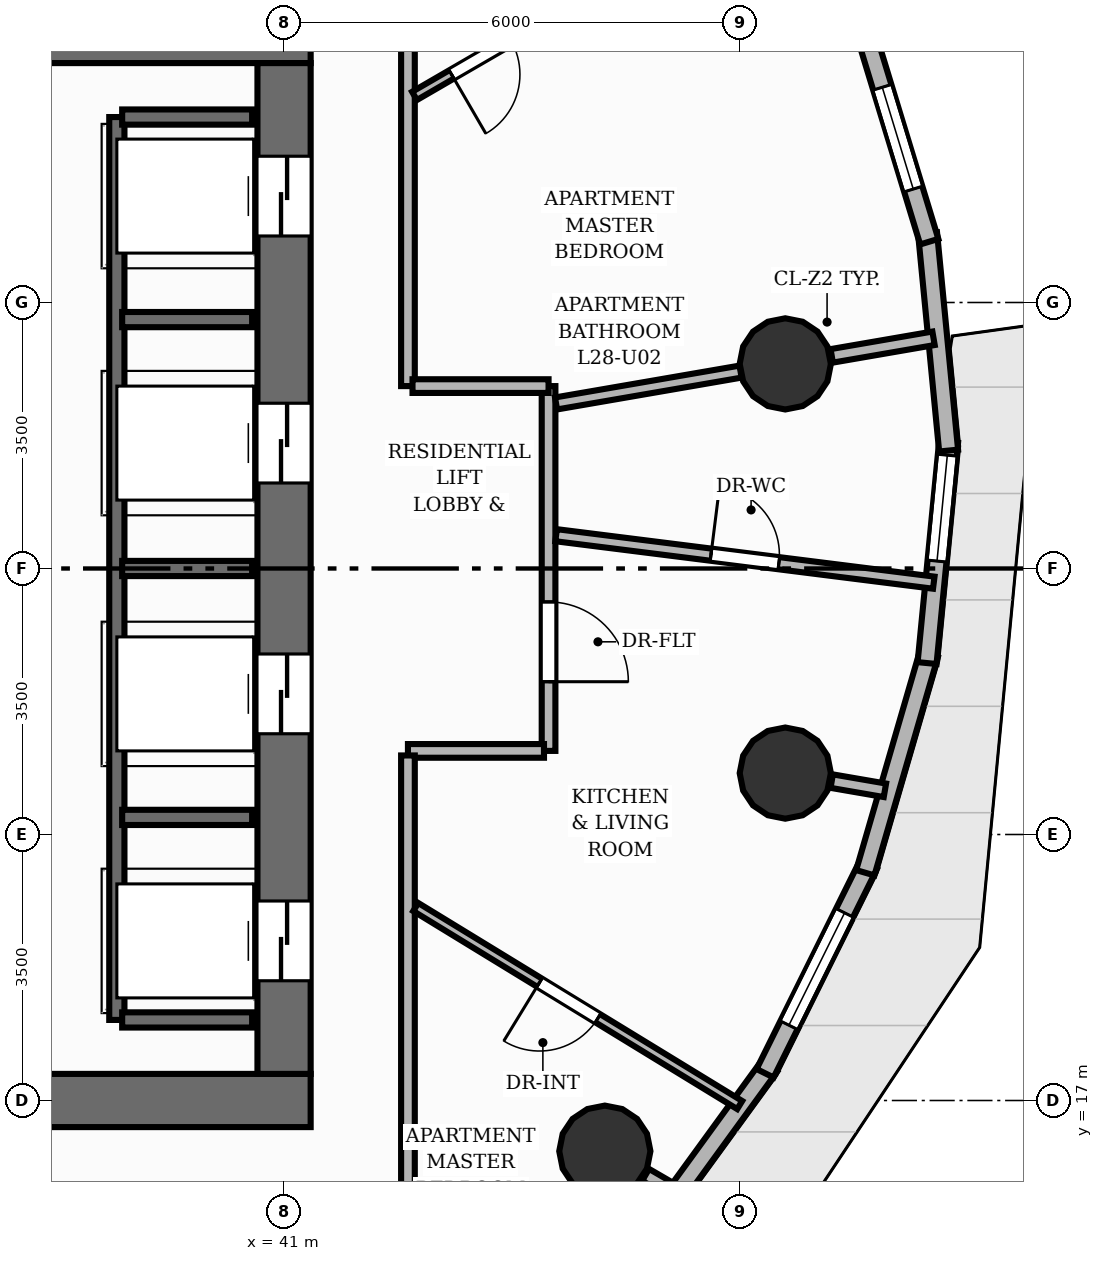
"""IFC4 building model, lengths in metres.
Left out: names, types, materials, properties, quantities, classifications, styles, units other than length and angle.
Written with IfcOpenShell. Run it as: python <this file> out.ifc"""

import sys

from ifc_helpers import new_model, si_unit, direction, frame, frame_2d, origin, origin_2d, place, context, subcontext, project, spatial, rectangle, circle, extrude, element, fill, save


model = new_model("IFC4")
c1 = context("Model", 3, precision=1e-05, world=origin(), true_north=direction((0.0, 1.0)))
c2 = subcontext(c1, "Body", "Model", "MODEL_VIEW")
j1 = project(units=[si_unit("LENGTHUNIT", "METRE"), si_unit("PLANEANGLEUNIT", "RADIAN")], contexts=[c1])
p1 = place(None, origin())
s1 = spatial("IfcSite", under=j1, at=p1, CompositionType="ELEMENT")
p2 = place(p1, origin())
s2 = spatial("IfcBuilding", under=s1, at=p2, CompositionType="ELEMENT")
p3 = place(p2, frame((0.0, 0.0, 96.48)))
s3 = spatial("IfcBuildingStorey", under=s2, at=p3, CompositionType="ELEMENT", Elevation=96.48)
p4 = place(p3, frame((22.65, 17.0, 0.0), z_axis=(0.0, 0.0, 1.0), x_axis=(1.0, 0.0, 0.0)))
e1 = element("IfcWall", 1, at=p4, inside=s3, PredefinedType="SHEAR", context=c2, shape_type="SweptSolid", body=[
    extrude(rectangle(XDim=18.7, YDim=0.7, at=frame_2d((9.35, 0.0))), origin(), (0.0, 0.0, 1.0), 3.2),
])
p5 = place(p4, frame((5.85, 0.0, 0.0)))
e2 = element("IfcOpeningElement", 2, at=p5, cuts=e1, PredefinedType="OPENING", context=c2, shape_type="SweptSolid", body=[
    extrude(rectangle(XDim=1.1, YDim=2.15, at=frame_2d((0.55, 1.075))), frame((0.0, 0.36, 0.0), z_axis=(0.0, -1.0, 0.0), x_axis=(1.0, 0.0, 0.0)), (0.0, 0.0, 1.0), 0.72),
])
p6 = place(p4, frame((9.4, 0.0, 0.0)))
e3 = element("IfcOpeningElement", 3, at=p6, cuts=e1, PredefinedType="OPENING", context=c2, shape_type="SweptSolid", body=[
    extrude(rectangle(XDim=0.9, YDim=2.1, at=frame_2d((0.45, 1.05))), frame((0.0, 0.36, 0.0), z_axis=(0.0, -1.0, 0.0), x_axis=(1.0, 0.0, 0.0)), (0.0, 0.0, 1.0), 0.72),
])
p7 = place(p3, frame((22.65, 31.0, 0.0), z_axis=(0.0, 0.0, 1.0), x_axis=(1.0, 0.0, 0.0)))
e4 = element("IfcWall", 4, at=p7, inside=s3, PredefinedType="SHEAR", context=c2, shape_type="SweptSolid", body=[
    extrude(rectangle(XDim=18.7, YDim=0.7, at=frame_2d((9.35, 0.0))), origin(), (0.0, 0.0, 1.0), 3.2),
])
p8 = place(p7, frame((11.75, 0.0, 0.0)))
e5 = element("IfcOpeningElement", 5, at=p8, cuts=e4, PredefinedType="OPENING", context=c2, shape_type="SweptSolid", body=[
    extrude(rectangle(XDim=1.1, YDim=2.15, at=frame_2d((0.55, 1.075))), frame((0.0, 0.36, 0.0), z_axis=(0.0, -1.0, 0.0), x_axis=(1.0, 0.0, 0.0)), (0.0, 0.0, 1.0), 0.72),
])
p9 = place(p3, frame((41.0, 17.35, 0.0), z_axis=(0.0, 0.0, 1.0), x_axis=(0.0, 1.0, 0.0)))
e6 = element("IfcWall", 6, at=p9, inside=s3, PredefinedType="SHEAR", context=c2, shape_type="SweptSolid", body=[
    extrude(rectangle(XDim=13.3, YDim=0.7, at=frame_2d((6.65, 0.0))), origin(), (0.0, 0.0, 1.0), 3.2),
])
p10 = place(p9, frame((1.225, 0.0, 0.0)))
e7 = element("IfcOpeningElement", 7, at=p10, cuts=e6, PredefinedType="OPENING", context=c2, shape_type="SweptSolid", body=[
    extrude(rectangle(XDim=1.05, YDim=2.15, at=frame_2d((0.525, 1.075))), frame((0.0, 0.36, 0.0), z_axis=(0.0, -1.0, 0.0), x_axis=(1.0, 0.0, 0.0)), (0.0, 0.0, 1.0), 0.72),
])
p11 = place(p9, frame((4.475, 0.0, 0.0)))
e8 = element("IfcOpeningElement", 8, at=p11, cuts=e6, PredefinedType="OPENING", context=c2, shape_type="SweptSolid", body=[
    extrude(rectangle(XDim=1.05, YDim=2.15, at=frame_2d((0.525, 1.075))), frame((0.0, 0.36, 0.0), z_axis=(0.0, -1.0, 0.0), x_axis=(1.0, 0.0, 0.0)), (0.0, 0.0, 1.0), 0.72),
])
p12 = place(p9, frame((7.775, 0.0, 0.0)))
e9 = element("IfcOpeningElement", 9, at=p12, cuts=e6, PredefinedType="OPENING", context=c2, shape_type="SweptSolid", body=[
    extrude(rectangle(XDim=1.05, YDim=2.15, at=frame_2d((0.525, 1.075))), frame((0.0, 0.36, 0.0), z_axis=(0.0, -1.0, 0.0), x_axis=(1.0, 0.0, 0.0)), (0.0, 0.0, 1.0), 0.72),
])
p13 = place(p9, frame((11.025, 0.0, 0.0)))
e10 = element("IfcOpeningElement", 10, at=p13, cuts=e6, PredefinedType="OPENING", context=c2, shape_type="SweptSolid", body=[
    extrude(rectangle(XDim=1.05, YDim=2.15, at=frame_2d((0.525, 1.075))), frame((0.0, 0.36, 0.0), z_axis=(0.0, -1.0, 0.0), x_axis=(1.0, 0.0, 0.0)), (0.0, 0.0, 1.0), 0.72),
])
for number, where, z_axis, x_axis in (
    (11, (47.594, 26.692, 0.0), (0.0, 0.0, 1.0), (1.0, 0.0, 0.0)),
    (12, (45.22, 16.333, 0.0), (0.0, 0.0, 1.0), (1.0, 0.0, 0.0)),
    (13, (47.594, 21.308, 0.0), (0.0, 0.0, 1.0), (1.0, 0.0, 0.0)),
):
    element("IfcColumn", number, at=place(p3, frame(where, z_axis=z_axis, x_axis=x_axis)), inside=s3, PredefinedType="COLUMN", context=c2, shape_type="SweptSolid", body=[
        extrude(circle(Radius=0.6, at=origin_2d()), origin(), (0.0, 0.0, 1.0), 3.2),
    ])
p14 = place(p3, frame((47.386, 17.453, 0.0), z_axis=(0.0, 0.0, 1.0), x_axis=(-0.588208785685, -0.808709109905, 0.0)))
e14 = element("IfcWall", 14, at=p14, inside=s3, PredefinedType="SOLIDWALL", context=c2, shape_type="SweptSolid", body=[
    extrude(rectangle(XDim=3.131, YDim=0.25, at=frame_2d((1.565, 0.0))), origin(), (0.0, 0.0, 1.0), 2.96),
])
p15 = place(p3, frame((48.688, 20.101, 0.0), z_axis=(0.0, 0.0, 1.0), x_axis=(-0.443988069997, -0.896032696781, 0.0)))
e15 = element("IfcWall", 15, at=p15, inside=s3, PredefinedType="SOLIDWALL", context=c2, shape_type="SweptSolid", body=[
    extrude(rectangle(XDim=3.061, YDim=0.25, at=frame_2d((1.53, 0.0))), origin(), (0.0, 0.0, 1.0), 2.96),
])
p16 = place(p15, frame((0.705, 0.0, 0.85)))
e16 = element("IfcOpeningElement", 16, at=p16, cuts=e15, PredefinedType="OPENING", context=c2, shape_type="SweptSolid", body=[
    extrude(rectangle(XDim=1.65, YDim=1.55, at=frame_2d((0.825, 0.775))), frame((0.0, 0.135, 0.0), z_axis=(0.0, -1.0, 0.0), x_axis=(1.0, 0.0, 0.0)), (0.0, 0.0, 1.0), 0.27),
])
p17 = place(p3, frame((49.481, 22.866, 0.0), z_axis=(0.0, 0.0, 1.0), x_axis=(-0.279152874041, -0.960246672952, 0.0)))
e17 = element("IfcWall", 17, at=p17, inside=s3, PredefinedType="SOLIDWALL", context=c2, shape_type="SweptSolid", body=[
    extrude(rectangle(XDim=2.989, YDim=0.25, at=frame_2d((1.494, 0.0))), origin(), (0.0, 0.0, 1.0), 2.96),
])
p18 = place(p3, frame((49.743, 25.665, 0.0), z_axis=(0.0, 0.0, 1.0), x_axis=(-0.096873982201, -0.995296655059, 0.0)))
e18 = element("IfcWall", 18, at=p18, inside=s3, PredefinedType="SOLIDWALL", context=c2, shape_type="SweptSolid", body=[
    extrude(rectangle(XDim=2.923, YDim=0.25, at=frame_2d((1.462, 0.0))), origin(), (0.0, 0.0, 1.0), 2.96),
])
p19 = place(p18, frame((0.175, 0.0, 0.85)))
e19 = element("IfcOpeningElement", 19, at=p19, cuts=e18, PredefinedType="OPENING", context=c2, shape_type="SweptSolid", body=[
    extrude(rectangle(XDim=1.4, YDim=1.55, at=frame_2d((0.7, 0.775))), frame((0.0, 0.135, 0.0), z_axis=(0.0, -1.0, 0.0), x_axis=(1.0, 0.0, 0.0)), (0.0, 0.0, 1.0), 0.27),
])
p20 = place(p3, frame((49.467, 28.412, 0.0), z_axis=(0.0, 0.0, 1.0), x_axis=(0.096332339466, -0.995349225334, 0.0)))
e20 = element("IfcWall", 20, at=p20, inside=s3, PredefinedType="SOLIDWALL", context=c2, shape_type="SweptSolid", body=[
    extrude(rectangle(XDim=2.874, YDim=0.25, at=frame_2d((1.437, 0.0))), origin(), (0.0, 0.0, 1.0), 2.96),
])
p21 = place(p3, frame((48.66, 31.024, 0.0), z_axis=(0.0, 0.0, 1.0), x_axis=(0.291144558409, -0.956679071637, 0.0)))
e21 = element("IfcWall", 21, at=p21, inside=s3, PredefinedType="SOLIDWALL", context=c2, shape_type="SweptSolid", body=[
    extrude(rectangle(XDim=2.848, YDim=0.25, at=frame_2d((1.424, 0.0))), origin(), (0.0, 0.0, 1.0), 2.96),
])
p22 = place(p21, frame((0.724, 0.0, 0.85)))
e22 = element("IfcOpeningElement", 22, at=p22, cuts=e21, PredefinedType="OPENING", context=c2, shape_type="SweptSolid", body=[
    extrude(rectangle(XDim=1.4, YDim=1.55, at=frame_2d((0.7, 0.775))), frame((0.0, 0.135, 0.0), z_axis=(0.0, -1.0, 0.0), x_axis=(1.0, 0.0, 0.0)), (0.0, 0.0, 1.0), 0.27),
])
p23 = place(p3, frame((38.8, 18.06, 0.0), z_axis=(0.0, 0.0, 1.0), x_axis=(0.0, 1.0, 0.0)))
e23 = element("IfcWall", 23, at=p23, inside=s3, PredefinedType="SHEAR", context=c2, shape_type="SweptSolid", body=[
    extrude(rectangle(XDim=11.88, YDim=0.2, at=frame_2d((5.94, 0.0))), origin(), (0.0, 0.0, 1.0), 3.2),
])
for number, where, z_axis, x_axis in (
    (24, (38.87, 18.06, 0.0), (0.0, 0.0, 1.0), (1.0, 0.0, 0.0)),
    (25, (38.87, 29.94, 0.0), (0.0, 0.0, 1.0), (1.0, 0.0, 0.0)),
    (26, (38.87, 20.725, 0.0), (0.0, 0.0, 1.0), (1.0, 0.0, 0.0)),
    (27, (38.87, 24.0, 0.0), (0.0, 0.0, 1.0), (1.0, 0.0, 0.0)),
    (28, (38.87, 27.275, 0.0), (0.0, 0.0, 1.0), (1.0, 0.0, 0.0)),
):
    element("IfcWall", number, at=place(p3, frame(where, z_axis=z_axis, x_axis=x_axis)), inside=s3, PredefinedType="SHEAR", context=c2, shape_type="SweptSolid", body=[
        extrude(rectangle(XDim=1.71, YDim=0.2, at=frame_2d((0.855, 0.0))), origin(), (0.0, 0.0, 1.0), 3.2),
    ])
p24 = place(p3, frame((48.206, 26.798, 0.0), z_axis=(0.0, 0.0, 1.0), x_axis=(0.98540615772, 0.170219576807, 0.0)))
e29 = element("IfcWall", 29, at=p24, inside=s3, PredefinedType="PARTITIONING", context=c2, shape_type="SweptSolid", body=[
    extrude(rectangle(XDim=1.36, YDim=0.18, at=frame_2d((0.68, 0.0))), origin(), (0.0, 0.0, 1.0), 2.26),
])
p25 = place(p3, frame((45.757, 16.022, 0.0), z_axis=(0.0, 0.0, 1.0), x_axis=(0.864926134071, -0.501899175733, 0.0)))
e30 = element("IfcWall", 30, at=p25, inside=s3, PredefinedType="PARTITIONING", context=c2, shape_type="SweptSolid", body=[
    extrude(rectangle(XDim=0.424, YDim=0.18, at=frame_2d((0.212, 0.0))), origin(), (0.0, 0.0, 1.0), 2.26),
])
p26 = place(p3, frame((48.206, 21.202, 0.0), z_axis=(0.0, 0.0, 1.0), x_axis=(0.985420399327, -0.17013711115, 0.0)))
e31 = element("IfcWall", 31, at=p26, inside=s3, PredefinedType="PARTITIONING", context=c2, shape_type="SweptSolid", body=[
    extrude(rectangle(XDim=0.71, YDim=0.18, at=frame_2d((0.355, 0.0))), origin(), (0.0, 0.0, 1.0), 2.26),
])
p27 = place(p3, frame((44.48, 26.4, 0.0), z_axis=(0.0, 0.0, 1.0), x_axis=(0.0, -1.0, 0.0)))
e32 = element("IfcWall", 32, at=p27, inside=s3, PredefinedType="PARTITIONING", context=c2, shape_type="SweptSolid", body=[
    extrude(rectangle(XDim=4.8, YDim=0.18, at=frame_2d((2.4, 0.0))), origin(), (0.0, 0.0, 1.0), 2.955),
])
p28 = place(p27, frame((2.84, 0.0, 0.0)))
e33 = element("IfcOpeningElement", 33, at=p28, cuts=e32, PredefinedType="OPENING", context=c2, shape_type="SweptSolid", body=[
    extrude(rectangle(XDim=1.05, YDim=2.15, at=frame_2d((0.525, 1.075))), frame((0.0, 0.1, 0.0), z_axis=(0.0, -1.0, 0.0), x_axis=(1.0, 0.0, 0.0)), (0.0, 0.0, 1.0), 0.2),
])
p29 = place(p3, frame((44.42, 21.6, 0.0), z_axis=(0.0, 0.0, 1.0), x_axis=(-1.0, 0.0, 0.0)))
e34 = element("IfcWall", 34, at=p29, inside=s3, PredefinedType="PARTITIONING", context=c2, shape_type="SweptSolid", body=[
    extrude(rectangle(XDim=1.79, YDim=0.18, at=frame_2d((0.895, 0.0))), origin(), (0.0, 0.0, 1.0), 2.26),
])
p30 = place(p3, frame((42.63, 21.54, 0.0), z_axis=(0.0, 0.0, 1.0), x_axis=(0.0, -1.0, 0.0)))
e35 = element("IfcWall", 35, at=p30, inside=s3, PredefinedType="PARTITIONING", context=c2, shape_type="SweptSolid", body=[
    extrude(rectangle(XDim=6.17, YDim=0.18, at=frame_2d((3.085, 0.0))), origin(), (0.0, 0.0, 1.0), 2.955),
])
p31 = place(p3, frame((42.63, 32.63, 0.0), z_axis=(0.0, 0.0, 1.0), x_axis=(0.0, -1.0, 0.0)))
e36 = element("IfcWall", 36, at=p31, inside=s3, PredefinedType="PARTITIONING", context=c2, shape_type="SweptSolid", body=[
    extrude(rectangle(XDim=6.23, YDim=0.18, at=frame_2d((3.115, 0.0))), origin(), (0.0, 0.0, 1.0), 2.955),
])
p32 = place(p3, frame((42.69, 26.4, 0.0), z_axis=(0.0, 0.0, 1.0), x_axis=(1.0, 0.0, 0.0)))
e37 = element("IfcWall", 37, at=p32, inside=s3, PredefinedType="PARTITIONING", context=c2, shape_type="SweptSolid", body=[
    extrude(rectangle(XDim=1.79, YDim=0.18, at=frame_2d((0.895, 0.0))), origin(), (0.0, 0.0, 1.0), 2.26),
])
p33 = place(p3, frame((44.579, 24.438, 0.0), z_axis=(0.0, 0.0, 1.0), x_axis=(0.99219440442, -0.124700697023, 0.0)))
e38 = element("IfcWall", 38, at=p33, inside=s3, PredefinedType="PLUMBINGWALL", context=c2, shape_type="SweptSolid", body=[
    extrude(rectangle(XDim=5.008, YDim=0.16, at=frame_2d((2.504, 0.0))), origin(), (0.0, 0.0, 1.0), 2.955),
])
p34 = place(p33, frame((2.054, 0.0, 0.0)))
e39 = element("IfcOpeningElement", 39, at=p34, cuts=e38, PredefinedType="OPENING", context=c2, shape_type="SweptSolid", body=[
    extrude(rectangle(XDim=0.9, YDim=2.1, at=frame_2d((0.45, 1.05))), frame((0.0, 0.09, 0.0), z_axis=(0.0, -1.0, 0.0), x_axis=(1.0, 0.0, 0.0)), (0.0, 0.0, 1.0), 0.18),
])
p35 = place(p3, frame((46.995, 16.94, 0.0), z_axis=(0.0, 0.0, 1.0), x_axis=(-0.85322505129, 0.521542914678, 0.0)))
e40 = element("IfcWall", 40, at=p35, inside=s3, PredefinedType="PARTITIONING", context=c2, shape_type="SweptSolid", body=[
    extrude(rectangle(XDim=4.996, YDim=0.125, at=frame_2d((2.498, 0.0))), origin(), (0.0, 0.0, 1.0), 2.641),
])
p36 = place(p35, frame((2.188, 0.0, 0.0)))
e41 = element("IfcOpeningElement", 41, at=p36, cuts=e40, PredefinedType="OPENING", context=c2, shape_type="SweptSolid", body=[
    extrude(rectangle(XDim=0.9, YDim=2.1, at=frame_2d((0.45, 1.05))), frame((0.0, 0.073, 0.0), z_axis=(0.0, -1.0, 0.0), x_axis=(1.0, 0.0, 0.0)), (0.0, 0.0, 1.0), 0.145),
])
p37 = place(p3, frame((44.579, 26.171, 0.0), z_axis=(0.0, 0.0, 1.0), x_axis=(0.985404570769, 0.170228763457, 0.0)))
e42 = element("IfcWall", 42, at=p37, inside=s3, PredefinedType="PLUMBINGWALL", context=c2, shape_type="SweptSolid", body=[
    extrude(rectangle(XDim=2.464, YDim=0.16, at=frame_2d((1.232, 0.0))), origin(), (0.0, 0.0, 1.0), 2.26),
])
p38 = place(p3, frame((44.711, 31.375, 0.0), z_axis=(0.0, 0.0, 1.0), x_axis=(-0.864966854608, -0.501828995207, 0.0)))
e43 = element("IfcWall", 43, at=p38, inside=s3, PredefinedType="PARTITIONING", context=c2, shape_type="SweptSolid", body=[
    extrude(rectangle(XDim=2.306, YDim=0.125, at=frame_2d((1.153, 0.0))), origin(), (0.0, 0.0, 1.0), 2.26),
])
p39 = place(p38, frame((0.843, 0.0, 0.0)))
e44 = element("IfcOpeningElement", 44, at=p39, cuts=e43, PredefinedType="OPENING", context=c2, shape_type="SweptSolid", body=[
    extrude(rectangle(XDim=0.9, YDim=2.1, at=frame_2d((0.45, 1.05))), frame((0.0, 0.073, 0.0), z_axis=(0.0, -1.0, 0.0), x_axis=(1.0, 0.0, 0.0)), (0.0, 0.0, 1.0), 0.145),
])
p40 = place(p16, origin())
e45 = element("IfcWindow", 45, at=p40, inside=s3, PartitioningType="SINGLE_PANEL", PredefinedType="WINDOW", context=c2, shape_type="SweptSolid", body=[
    extrude(rectangle(XDim=1.65, YDim=1.55, at=frame_2d((0.825, 0.775))), frame((0.0, 0.03, 0.0), z_axis=(0.0, -1.0, 0.0), x_axis=(1.0, 0.0, 0.0)), (0.0, 0.0, 1.0), 0.06),
])
fill(e16, e45)
p41 = place(p19, origin())
e46 = element("IfcWindow", 46, at=p41, inside=s3, PartitioningType="SINGLE_PANEL", PredefinedType="WINDOW", context=c2, shape_type="SweptSolid", body=[
    extrude(rectangle(XDim=1.4, YDim=1.55, at=frame_2d((0.7, 0.775))), frame((0.0, 0.03, 0.0), z_axis=(0.0, -1.0, 0.0), x_axis=(1.0, 0.0, 0.0)), (0.0, 0.0, 1.0), 0.06),
])
fill(e19, e46)
p42 = place(p22, origin())
e47 = element("IfcWindow", 47, at=p42, inside=s3, PartitioningType="SINGLE_PANEL", PredefinedType="WINDOW", context=c2, shape_type="SweptSolid", body=[
    extrude(rectangle(XDim=1.4, YDim=1.55, at=frame_2d((0.7, 0.775))), frame((0.0, 0.03, 0.0), z_axis=(0.0, -1.0, 0.0), x_axis=(1.0, 0.0, 0.0)), (0.0, 0.0, 1.0), 0.06),
])
fill(e22, e47)
p43 = place(p10, origin())
e48 = element("IfcDoor", 48, at=p43, inside=s3, OperationType="DOUBLE_DOOR_SLIDING", PredefinedType="DOOR", context=c2, shape_type="SweptSolid", body=[
    extrude(rectangle(XDim=1.05, YDim=2.15, at=frame_2d((0.525, 1.075))), frame((0.0, 0.025, 0.0), z_axis=(0.0, -1.0, 0.0), x_axis=(1.0, 0.0, 0.0)), (0.0, 0.0, 1.0), 0.05),
])
fill(e7, e48)
p44 = place(p11, origin())
e49 = element("IfcDoor", 49, at=p44, inside=s3, OperationType="DOUBLE_DOOR_SLIDING", PredefinedType="DOOR", context=c2, shape_type="SweptSolid", body=[
    extrude(rectangle(XDim=1.05, YDim=2.15, at=frame_2d((0.525, 1.075))), frame((0.0, 0.025, 0.0), z_axis=(0.0, -1.0, 0.0), x_axis=(1.0, 0.0, 0.0)), (0.0, 0.0, 1.0), 0.05),
])
fill(e8, e49)
p45 = place(p12, origin())
e50 = element("IfcDoor", 50, at=p45, inside=s3, OperationType="DOUBLE_DOOR_SLIDING", PredefinedType="DOOR", context=c2, shape_type="SweptSolid", body=[
    extrude(rectangle(XDim=1.05, YDim=2.15, at=frame_2d((0.525, 1.075))), frame((0.0, 0.025, 0.0), z_axis=(0.0, -1.0, 0.0), x_axis=(1.0, 0.0, 0.0)), (0.0, 0.0, 1.0), 0.05),
])
fill(e9, e50)
p46 = place(p13, origin())
e51 = element("IfcDoor", 51, at=p46, inside=s3, OperationType="DOUBLE_DOOR_SLIDING", PredefinedType="DOOR", context=c2, shape_type="SweptSolid", body=[
    extrude(rectangle(XDim=1.05, YDim=2.15, at=frame_2d((0.525, 1.075))), frame((0.0, 0.025, 0.0), z_axis=(0.0, -1.0, 0.0), x_axis=(1.0, 0.0, 0.0)), (0.0, 0.0, 1.0), 0.05),
])
fill(e10, e51)
p47 = place(p28, origin())
e52 = element("IfcDoor", 52, at=p47, inside=s3, OperationType="SINGLE_SWING_RIGHT", PredefinedType="DOOR", context=c2, shape_type="SweptSolid", body=[
    extrude(rectangle(XDim=1.05, YDim=2.15, at=frame_2d((0.525, 1.075))), frame((0.0, 0.025, 0.0), z_axis=(0.0, -1.0, 0.0), x_axis=(1.0, 0.0, 0.0)), (0.0, 0.0, 1.0), 0.05),
])
fill(e33, e52)
p48 = place(p34, origin())
e53 = element("IfcDoor", 53, at=p48, inside=s3, OperationType="SINGLE_SWING_LEFT", PredefinedType="DOOR", context=c2, shape_type="SweptSolid", body=[
    extrude(rectangle(XDim=0.9, YDim=2.1, at=frame_2d((0.45, 1.05))), frame((0.0, 0.025, 0.0), z_axis=(0.0, -1.0, 0.0), x_axis=(1.0, 0.0, 0.0)), (0.0, 0.0, 1.0), 0.05),
])
fill(e39, e53)
p49 = place(p36, origin())
e54 = element("IfcDoor", 54, at=p49, inside=s3, OperationType="SINGLE_SWING_RIGHT", PredefinedType="DOOR", context=c2, shape_type="SweptSolid", body=[
    extrude(rectangle(XDim=0.9, YDim=2.1, at=frame_2d((0.45, 1.05))), frame((0.0, 0.025, 0.0), z_axis=(0.0, -1.0, 0.0), x_axis=(1.0, 0.0, 0.0)), (0.0, 0.0, 1.0), 0.05),
])
fill(e41, e54)
p50 = place(p39, origin())
e55 = element("IfcDoor", 55, at=p50, inside=s3, OperationType="SINGLE_SWING_RIGHT", PredefinedType="DOOR", context=c2, shape_type="SweptSolid", body=[
    extrude(rectangle(XDim=0.9, YDim=2.1, at=frame_2d((0.45, 1.05))), frame((0.0, 0.025, 0.0), z_axis=(0.0, -1.0, 0.0), x_axis=(1.0, 0.0, 0.0)), (0.0, 0.0, 1.0), 0.05),
])
fill(e44, e55)
save(model, sys.argv[1])
